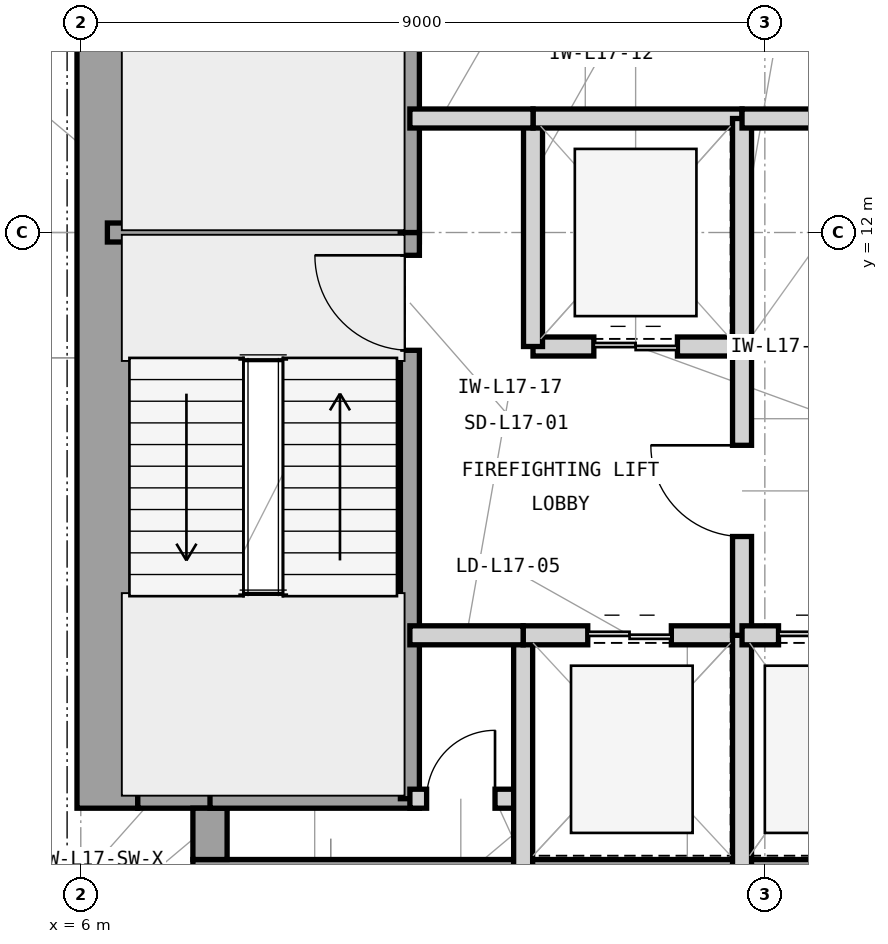
"""IFC4 building model, lengths in metres.
Left out: names, types, materials, properties, quantities, classifications, styles, units other than length and angle.
Written with IfcOpenShell. Run it as: python <this file> out.ifc"""

import sys

from ifc_helpers import new_model, si_unit, direction, frame, frame_2d, origin, place, context, subcontext, project, spatial, rectangle, extrude, element, fill, save


model = new_model("IFC4")
c1 = context("Model", 3, precision=1e-05, world=origin(), true_north=direction((0.0, 1.0)))
c2 = subcontext(c1, "Body", "Model", "MODEL_VIEW")
j1 = project(units=[si_unit("LENGTHUNIT", "METRE"), si_unit("PLANEANGLEUNIT", "RADIAN")], contexts=[c1])
p1 = place(None, origin())
s1 = spatial("IfcSite", under=j1, at=p1, CompositionType="ELEMENT")
p2 = place(p1, origin())
s2 = spatial("IfcBuilding", under=s1, at=p2, CompositionType="ELEMENT")
p3 = place(p2, frame((0.0, 0.0, 76.2)))
s3 = spatial("IfcBuildingStorey", under=s2, at=p3, CompositionType="ELEMENT", Elevation=76.2)
p4 = place(p3, frame((7.475, 3.35, 0.0), z_axis=(0.0, 0.0, 1.0), x_axis=(1.0, 0.0, 0.0)))
e1 = element("IfcWall", 1, at=p4, inside=s3, PredefinedType="SHEAR", context=c2, shape_type="SweptSolid", body=[
    extrude(rectangle(XDim=16.575, YDim=0.8, at=frame_2d((8.288, 0.0))), origin(), (0.0, 0.0, 1.0), 4.2),
])
p5 = place(p3, frame((6.35, 4.425, 0.0), z_axis=(0.0, 0.0, 1.0), x_axis=(0.0, 1.0, 0.0)))
e2 = element("IfcWall", 2, at=p5, inside=s3, PredefinedType="SHEAR", context=c2, shape_type="SweptSolid", body=[
    extrude(rectangle(XDim=15.15, YDim=0.8, at=frame_2d((7.575, 0.0))), origin(), (0.0, 0.0, 1.0), 4.2),
])
p6 = place(p3, frame((6.75, 4.65, 0.0), z_axis=(0.0, 0.0, 1.0), x_axis=(1.0, 0.0, 0.0)))
e3 = element("IfcWall", 3, at=p6, inside=s3, PredefinedType="SHEAR", context=c2, shape_type="SweptSolid", body=[
    extrude(rectangle(XDim=1.175, YDim=0.45, at=frame_2d((0.587, 0.0))), origin(), (0.0, 0.0, 1.0), 4.2),
])
p7 = place(p3, frame((7.7, 3.75, 0.0), z_axis=(0.0, 0.0, 1.0), x_axis=(0.0, 1.0, 0.0)))
e4 = element("IfcWall", 4, at=p7, inside=s3, PredefinedType="SHEAR", context=c2, shape_type="SweptSolid", body=[
    extrude(rectangle(XDim=0.675, YDim=0.45, at=frame_2d((0.337, 0.0))), origin(), (0.0, 0.0, 1.0), 4.2),
])
p8 = place(p3, frame((6.35, 12.0, 0.0), z_axis=(0.0, 0.0, 1.0), x_axis=(1.0, 0.0, 0.0)))
e5 = element("IfcWall", 5, at=p8, inside=s3, PredefinedType="SHEAR", context=c2, shape_type="SweptSolid", body=[
    extrude(rectangle(XDim=4.105, YDim=0.25, at=frame_2d((2.052, 0.0))), origin(), (0.0, 0.0, 1.0), 4.2),
])
p9 = place(p3, frame((7.7, 4.55, 0.0), z_axis=(0.0, 0.0, 1.0), x_axis=(1.0, 0.0, 0.0)))
e6 = element("IfcWall", 6, at=p9, inside=s3, PredefinedType="SHEAR", context=c2, shape_type="SweptSolid", body=[
    extrude(rectangle(XDim=2.755, YDim=0.25, at=frame_2d((1.377, 0.0))), origin(), (0.0, 0.0, 1.0), 4.2),
])
p10 = place(p3, frame((10.33, 4.55, 0.0), z_axis=(0.0, 0.0, 1.0), x_axis=(0.0, 1.0, 0.0)))
e7 = element("IfcWall", 7, at=p10, inside=s3, PredefinedType="SHEAR", context=c2, shape_type="SweptSolid", body=[
    extrude(rectangle(XDim=7.45, YDim=0.25, at=frame_2d((3.725, 0.0))), origin(), (0.0, 0.0, 1.0), 4.2),
])
p11 = place(p10, frame((5.9, 0.0, 0.0)))
e8 = element("IfcOpeningElement", 8, at=p11, cuts=e7, PredefinedType="OPENING", context=c2, shape_type="SweptSolid", body=[
    extrude(rectangle(XDim=1.25, YDim=2.2, at=frame_2d((0.625, 1.1))), frame((0.0, 0.135, 0.0), z_axis=(0.0, -1.0, 0.0), x_axis=(1.0, 0.0, 0.0)), (0.0, 0.0, 1.0), 0.27),
])
p12 = place(p3, frame((10.33, 12.0, 0.0), z_axis=(0.0, 0.0, 1.0), x_axis=(0.0, 1.0, 0.0)))
e9 = element("IfcWall", 9, at=p12, inside=s3, PredefinedType="SHEAR", context=c2, shape_type="SweptSolid", body=[
    extrude(rectangle(XDim=7.45, YDim=0.25, at=frame_2d((3.725, 0.0))), origin(), (0.0, 0.0, 1.0), 4.2),
])
p13 = place(p12, frame((5.85, 0.0, 0.0)))
e10 = element("IfcOpeningElement", 10, at=p13, cuts=e9, PredefinedType="OPENING", context=c2, shape_type="SweptSolid", body=[
    extrude(rectangle(XDim=1.25, YDim=2.2, at=frame_2d((0.625, 1.1))), frame((0.0, 0.135, 0.0), z_axis=(0.0, -1.0, 0.0), x_axis=(1.0, 0.0, 0.0)), (0.0, 0.0, 1.0), 0.27),
])
p14 = place(p3, frame((10.33, 4.55, 0.0), z_axis=(0.0, 0.0, 1.0), x_axis=(1.0, 0.0, 0.0)))
e11 = element("IfcWall", 11, at=p14, inside=s3, PredefinedType="PARTITIONING", context=c2, shape_type="SweptSolid", body=[
    extrude(rectangle(XDim=1.49, YDim=0.25, at=frame_2d((0.745, 0.0))), origin(), (0.0, 0.0, 1.0), 3.97),
])
p15 = place(p14, frame((0.22, 0.0, 0.0)))
e12 = element("IfcOpeningElement", 12, at=p15, cuts=e11, PredefinedType="OPENING", context=c2, shape_type="SweptSolid", body=[
    extrude(rectangle(XDim=0.9, YDim=2.1, at=frame_2d((0.45, 1.05))), frame((0.0, 0.135, 0.0), z_axis=(0.0, -1.0, 0.0), x_axis=(1.0, 0.0, 0.0)), (0.0, 0.0, 1.0), 0.27),
])
p16 = place(p3, frame((11.82, 3.35, 0.0), z_axis=(0.0, 0.0, 1.0), x_axis=(0.0, 1.0, 0.0)))
e13 = element("IfcWall", 13, at=p16, inside=s3, PredefinedType="PARTITIONING", context=c2, shape_type="SweptSolid", body=[
    extrude(rectangle(XDim=3.35, YDim=0.25, at=frame_2d((1.675, 0.0))), origin(), (0.0, 0.0, 1.0), 3.97),
])
p17 = place(p3, frame((11.82, 6.7, 0.0), z_axis=(0.0, 0.0, 1.0), x_axis=(1.0, 0.0, 0.0)))
e14 = element("IfcWall", 14, at=p17, inside=s3, PredefinedType="PARTITIONING", context=c2, shape_type="SweptSolid", body=[
    extrude(rectangle(XDim=2.88, YDim=0.25, at=frame_2d((1.44, 0.0))), origin(), (0.0, 0.0, 1.0), 3.426),
])
p18 = place(p17, frame((0.85, 0.0, 0.0)))
e15 = element("IfcOpeningElement", 15, at=p18, cuts=e14, PredefinedType="OPENING", context=c2, shape_type="SweptSolid", body=[
    extrude(rectangle(XDim=1.1, YDim=2.25, at=frame_2d((0.55, 1.125))), frame((0.0, 0.135, 0.0), z_axis=(0.0, -1.0, 0.0), x_axis=(1.0, 0.0, 0.0)), (0.0, 0.0, 1.0), 0.27),
])
p19 = place(p3, frame((14.7, 3.35, 0.0), z_axis=(0.0, 0.0, 1.0), x_axis=(0.0, 1.0, 0.0)))
e16 = element("IfcWall", 16, at=p19, inside=s3, PredefinedType="PARTITIONING", context=c2, shape_type="SweptSolid", body=[
    extrude(rectangle(XDim=3.35, YDim=0.25, at=frame_2d((1.675, 0.0))), origin(), (0.0, 0.0, 1.0), 3.97),
])
p20 = place(p3, frame((11.95, 10.5, 0.0), z_axis=(0.0, 0.0, 1.0), x_axis=(1.0, 0.0, 0.0)))
e17 = element("IfcWall", 17, at=p20, inside=s3, PredefinedType="PARTITIONING", context=c2, shape_type="SweptSolid", body=[
    extrude(rectangle(XDim=2.75, YDim=0.25, at=frame_2d((1.375, 0.0))), origin(), (0.0, 0.0, 1.0), 3.426),
])
p21 = place(p20, frame((0.8, 0.0, 0.0)))
e18 = element("IfcOpeningElement", 18, at=p21, cuts=e17, PredefinedType="OPENING", context=c2, shape_type="SweptSolid", body=[
    extrude(rectangle(XDim=1.1, YDim=2.25, at=frame_2d((0.55, 1.125))), frame((0.0, 0.135, 0.0), z_axis=(0.0, -1.0, 0.0), x_axis=(1.0, 0.0, 0.0)), (0.0, 0.0, 1.0), 0.27),
])
p22 = place(p3, frame((11.95, 10.5, 0.0), z_axis=(0.0, 0.0, 1.0), x_axis=(0.0, 1.0, 0.0)))
e19 = element("IfcWall", 19, at=p22, inside=s3, PredefinedType="PARTITIONING", context=c2, shape_type="SweptSolid", body=[
    extrude(rectangle(XDim=3.0, YDim=0.25, at=frame_2d((1.5, 0.0))), origin(), (0.0, 0.0, 1.0), 3.97),
])
p23 = place(p3, frame((11.95, 13.5, 0.0), z_axis=(0.0, 0.0, 1.0), x_axis=(1.0, 0.0, 0.0)))
e20 = element("IfcWall", 20, at=p23, inside=s3, PredefinedType="PARTITIONING", context=c2, shape_type="SweptSolid", body=[
    extrude(rectangle(XDim=2.75, YDim=0.25, at=frame_2d((1.375, 0.0))), origin(), (0.0, 0.0, 1.0), 3.426),
])
p24 = place(p3, frame((14.7, 10.5, 0.0), z_axis=(0.0, 0.0, 1.0), x_axis=(0.0, 1.0, 0.0)))
e21 = element("IfcWall", 21, at=p24, inside=s3, PredefinedType="PARTITIONING", context=c2, shape_type="SweptSolid", body=[
    extrude(rectangle(XDim=3.0, YDim=0.25, at=frame_2d((1.5, 0.0))), origin(), (0.0, 0.0, 1.0), 3.97),
])
p25 = place(p3, frame((14.7, 6.7, 0.0), z_axis=(0.0, 0.0, 1.0), x_axis=(0.0, 1.0, 0.0)))
e22 = element("IfcWall", 22, at=p25, inside=s3, PredefinedType="PARTITIONING", context=c2, shape_type="SweptSolid", body=[
    extrude(rectangle(XDim=3.8, YDim=0.25, at=frame_2d((1.9, 0.0))), origin(), (0.0, 0.0, 1.0), 3.97),
])
p26 = place(p25, frame((1.3, 0.0, 0.0)))
e23 = element("IfcOpeningElement", 23, at=p26, cuts=e22, PredefinedType="OPENING", context=c2, shape_type="SweptSolid", body=[
    extrude(rectangle(XDim=1.2, YDim=2.2, at=frame_2d((0.6, 1.1))), frame((0.0, 0.135, 0.0), z_axis=(0.0, -1.0, 0.0), x_axis=(1.0, 0.0, 0.0)), (0.0, 0.0, 1.0), 0.27),
])
p27 = place(p3, frame((10.33, 13.5, 0.0), z_axis=(0.0, 0.0, 1.0), x_axis=(1.0, 0.0, 0.0)))
e24 = element("IfcWall", 24, at=p27, inside=s3, PredefinedType="PARTITIONING", context=c2, shape_type="SweptSolid", body=[
    extrude(rectangle(XDim=1.62, YDim=0.25, at=frame_2d((0.81, 0.0))), origin(), (0.0, 0.0, 1.0), 3.426),
])
p28 = place(p3, frame((10.33, 6.7, 0.0), z_axis=(0.0, 0.0, 1.0), x_axis=(1.0, 0.0, 0.0)))
e25 = element("IfcWall", 25, at=p28, inside=s3, PredefinedType="PARTITIONING", context=c2, shape_type="SweptSolid", body=[
    extrude(rectangle(XDim=1.49, YDim=0.25, at=frame_2d((0.745, 0.0))), origin(), (0.0, 0.0, 1.0), 3.426),
])
p29 = place(p3, frame((14.7, 6.7, 0.0), z_axis=(0.0, 0.0, 1.0), x_axis=(1.0, 0.0, 0.0)))
e26 = element("IfcWall", 26, at=p29, inside=s3, PredefinedType="PARTITIONING", context=c2, shape_type="SweptSolid", body=[
    extrude(rectangle(XDim=2.15, YDim=0.25, at=frame_2d((1.075, 0.0))), origin(), (0.0, 0.0, 1.0), 3.426),
])
p30 = place(p29, frame((0.48, 0.0, 0.0)))
e27 = element("IfcOpeningElement", 27, at=p30, cuts=e26, PredefinedType="OPENING", context=c2, shape_type="SweptSolid", body=[
    extrude(rectangle(XDim=1.15, YDim=2.25, at=frame_2d((0.575, 1.125))), frame((0.0, 0.135, 0.0), z_axis=(0.0, -1.0, 0.0), x_axis=(1.0, 0.0, 0.0)), (0.0, 0.0, 1.0), 0.27),
])
p31 = place(p3, frame((14.7, 10.5, 0.0), z_axis=(0.0, 0.0, 1.0), x_axis=(1.0, 0.0, 0.0)))
e28 = element("IfcWall", 28, at=p31, inside=s3, PredefinedType="PARTITIONING", context=c2, shape_type="SweptSolid", body=[
    extrude(rectangle(XDim=2.15, YDim=0.25, at=frame_2d((1.075, 0.0))), origin(), (0.0, 0.0, 1.0), 3.426),
])
p32 = place(p3, frame((14.7, 13.5, 0.0), z_axis=(0.0, 0.0, 1.0), x_axis=(1.0, 0.0, 0.0)))
e29 = element("IfcWall", 29, at=p32, inside=s3, PredefinedType="PARTITIONING", context=c2, shape_type="SweptSolid", body=[
    extrude(rectangle(XDim=8.95, YDim=0.25, at=frame_2d((4.475, 0.0))), origin(), (0.0, 0.0, 1.0), 3.426),
])
p33 = place(p11, origin())
e30 = element("IfcDoor", 30, at=p33, inside=s3, OperationType="SINGLE_SWING_RIGHT", PredefinedType="DOOR", context=c2, shape_type="SweptSolid", body=[
    extrude(rectangle(XDim=1.25, YDim=2.2, at=frame_2d((0.625, 1.1))), frame((0.0, 0.025, 0.0), z_axis=(0.0, -1.0, 0.0), x_axis=(1.0, 0.0, 0.0)), (0.0, 0.0, 1.0), 0.05),
])
fill(e8, e30)
p34 = place(p15, origin())
e31 = element("IfcDoor", 31, at=p34, inside=s3, OperationType="SINGLE_SWING_RIGHT", PredefinedType="TRAPDOOR", context=c2, shape_type="SweptSolid", body=[
    extrude(rectangle(XDim=0.9, YDim=2.1, at=frame_2d((0.45, 1.05))), frame((0.0, 0.025, 0.0), z_axis=(0.0, -1.0, 0.0), x_axis=(1.0, 0.0, 0.0)), (0.0, 0.0, 1.0), 0.05),
])
fill(e12, e31)
p35 = place(p18, origin())
e32 = element("IfcDoor", 32, at=p35, inside=s3, OperationType="DOUBLE_DOOR_SLIDING", PredefinedType="DOOR", context=c2, shape_type="SweptSolid", body=[
    extrude(rectangle(XDim=1.1, YDim=2.25, at=frame_2d((0.55, 1.125))), frame((0.0, 0.025, 0.0), z_axis=(0.0, -1.0, 0.0), x_axis=(1.0, 0.0, 0.0)), (0.0, 0.0, 1.0), 0.05),
])
fill(e15, e32)
p36 = place(p21, origin())
e33 = element("IfcDoor", 33, at=p36, inside=s3, OperationType="DOUBLE_DOOR_SLIDING", PredefinedType="DOOR", context=c2, shape_type="SweptSolid", body=[
    extrude(rectangle(XDim=1.1, YDim=2.25, at=frame_2d((0.55, 1.125))), frame((0.0, 0.025, 0.0), z_axis=(0.0, -1.0, 0.0), x_axis=(1.0, 0.0, 0.0)), (0.0, 0.0, 1.0), 0.05),
])
fill(e18, e33)
p37 = place(p26, origin())
e34 = element("IfcDoor", 34, at=p37, inside=s3, OperationType="SINGLE_SWING_RIGHT", PredefinedType="DOOR", context=c2, shape_type="SweptSolid", body=[
    extrude(rectangle(XDim=1.2, YDim=2.2, at=frame_2d((0.6, 1.1))), frame((0.0, 0.025, 0.0), z_axis=(0.0, -1.0, 0.0), x_axis=(1.0, 0.0, 0.0)), (0.0, 0.0, 1.0), 0.05),
])
fill(e23, e34)
p38 = place(p30, origin())
e35 = element("IfcDoor", 35, at=p38, inside=s3, OperationType="DOUBLE_DOOR_SLIDING", PredefinedType="DOOR", context=c2, shape_type="SweptSolid", body=[
    extrude(rectangle(XDim=1.15, YDim=2.25, at=frame_2d((0.575, 1.125))), frame((0.0, 0.025, 0.0), z_axis=(0.0, -1.0, 0.0), x_axis=(1.0, 0.0, 0.0)), (0.0, 0.0, 1.0), 0.05),
])
fill(e27, e35)
save(model, sys.argv[1])
